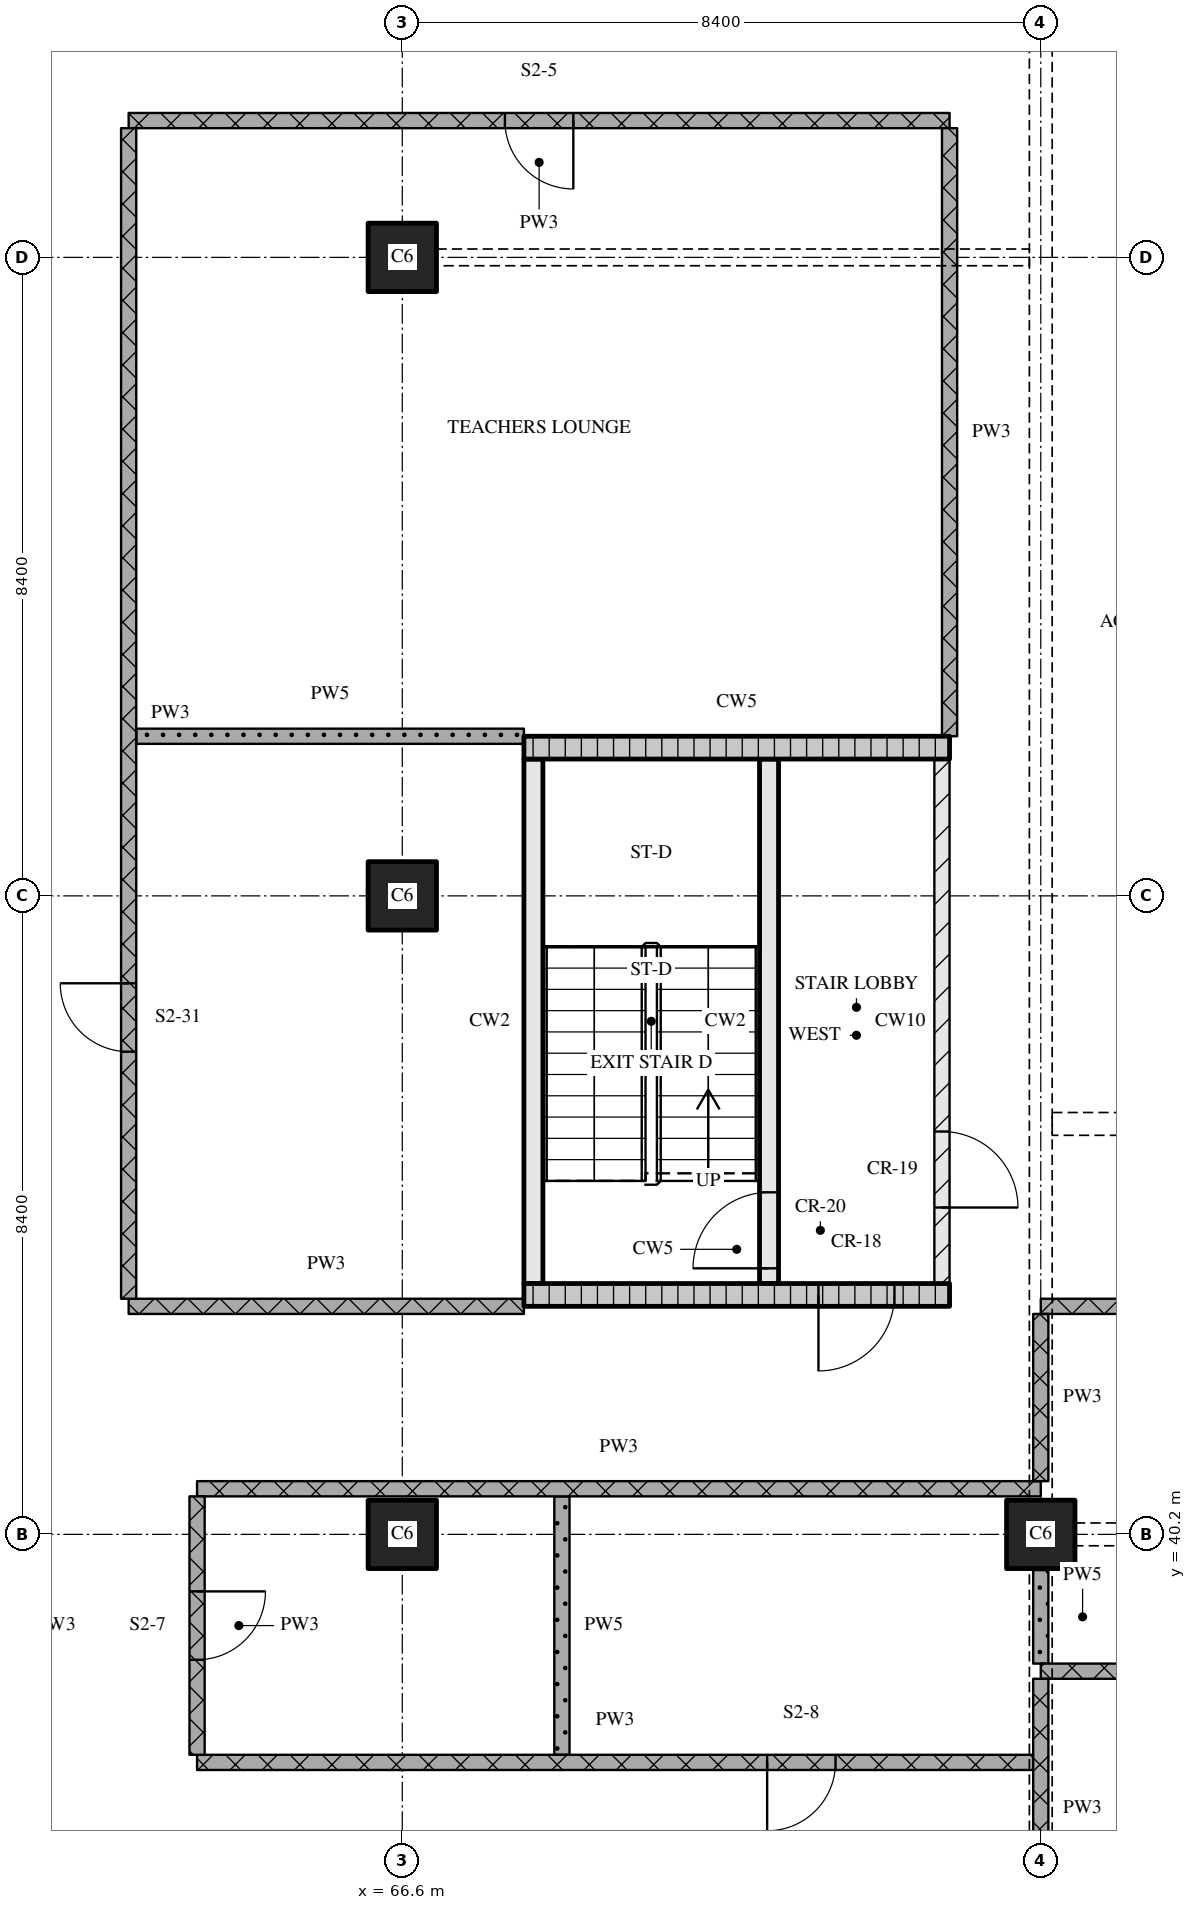
"""IFC4 building model, lengths in metres.
Left out: names, types, materials, properties, quantities, classifications, styles, units other than length and angle.
Written with IfcOpenShell. Run it as: python <this file> out.ifc"""

import sys

from ifc_helpers import new_model, si_unit, direction, frame, frame_2d, origin, origin_2d, place, context, subcontext, project, spatial, rectangle, extrude, element, fill, save


model = new_model("IFC4")
c1 = context("Model", 3, precision=1e-05, world=origin(), true_north=direction((0.0, 1.0)))
c2 = subcontext(c1, "Body", "Model", "MODEL_VIEW")
j1 = project(units=[si_unit("LENGTHUNIT", "METRE"), si_unit("PLANEANGLEUNIT", "RADIAN")], contexts=[c1])
p1 = place(None, origin())
s1 = spatial("IfcSite", under=j1, at=p1, CompositionType="ELEMENT")
p2 = place(p1, origin())
s2 = spatial("IfcBuilding", under=s1, at=p2, CompositionType="ELEMENT")
p3 = place(p2, frame((0.0, 0.0, 32.7)))
s3 = spatial("IfcBuildingStorey", under=s2, at=p3, CompositionType="ELEMENT", Elevation=32.7)
for number, where, z_axis, x_axis in (
    (1, (66.6, 40.2, 0.0), (0.0, 0.0, 1.0), (1.0, 0.0, 0.0)),
    (2, (66.6, 48.6, 0.0), (0.0, 0.0, 1.0), (1.0, 0.0, 0.0)),
    (3, (66.6, 57.0, 0.0), (0.0, 0.0, 1.0), (1.0, 0.0, 0.0)),
    (4, (75.0, 40.2, 0.0), (0.0, 0.0, 1.0), (1.0, 0.0, 0.0)),
):
    element("IfcColumn", number, at=place(p3, frame(where, z_axis=z_axis, x_axis=x_axis)), inside=s3, PredefinedType="COLUMN", context=c2, shape_type="SweptSolid", body=[
        extrude(rectangle(XDim=0.9, YDim=0.9, at=origin_2d()), origin(), (0.0, 0.0, 1.0), 4.5),
    ])
p4 = place(p3, frame((68.2, 43.35, 0.0), z_axis=(0.0, 0.0, 1.0), x_axis=(1.0, 0.0, 0.0)))
e5 = element("IfcWall", 5, at=p4, inside=s3, PredefinedType="SOLIDWALL", context=c2, shape_type="SweptSolid", body=[
    extrude(rectangle(XDim=5.6, YDim=0.3, at=frame_2d((2.8, 0.0))), origin(), (0.0, 0.0, 1.0), 4.22),
])
p5 = place(p4, frame((3.875, 0.0, 0.0)))
e6 = element("IfcOpeningElement", 6, at=p5, cuts=e5, PredefinedType="OPENING", context=c2, shape_type="SweptSolid", body=[
    extrude(rectangle(XDim=1.0, YDim=2.1, at=frame_2d((0.5, 1.05))), frame((0.0, 0.16, 0.0), z_axis=(0.0, -1.0, 0.0), x_axis=(1.0, 0.0, 0.0)), (0.0, 0.0, 1.0), 0.32),
])
p6 = place(p3, frame((68.325, 43.5, 0.0), z_axis=(0.0, 0.0, 1.0), x_axis=(0.0, 1.0, 0.0)))
e7 = element("IfcWall", 7, at=p6, inside=s3, PredefinedType="SOLIDWALL", context=c2, shape_type="SweptSolid", body=[
    extrude(rectangle(XDim=6.9, YDim=0.25, at=frame_2d((3.45, 0.0))), origin(), (0.0, 0.0, 1.0), 4.22),
])
p7 = place(p3, frame((71.425, 43.5, 0.0), z_axis=(0.0, 0.0, 1.0), x_axis=(0.0, 1.0, 0.0)))
e8 = element("IfcWall", 8, at=p7, inside=s3, PredefinedType="SOLIDWALL", context=c2, shape_type="SweptSolid", body=[
    extrude(rectangle(XDim=6.9, YDim=0.25, at=frame_2d((3.45, 0.0))), origin(), (0.0, 0.0, 1.0), 4.22),
])
p8 = place(p7, frame((0.2, 0.0, 0.0)))
e9 = element("IfcOpeningElement", 9, at=p8, cuts=e8, PredefinedType="OPENING", context=c2, shape_type="SweptSolid", body=[
    extrude(rectangle(XDim=1.0, YDim=2.1, at=frame_2d((0.5, 1.05))), frame((0.0, 0.135, 0.0), z_axis=(0.0, -1.0, 0.0), x_axis=(1.0, 0.0, 0.0)), (0.0, 0.0, 1.0), 0.27),
])
p9 = place(p3, frame((73.7, 43.5, 0.0), z_axis=(0.0, 0.0, 1.0), x_axis=(0.0, 1.0, 0.0)))
e10 = element("IfcWall", 10, at=p9, inside=s3, PredefinedType="PARTITIONING", context=c2, shape_type="SweptSolid", body=[
    extrude(rectangle(XDim=6.9, YDim=0.2, at=frame_2d((3.45, 0.0))), origin(), (0.0, 0.0, 1.0), 4.22),
])
p10 = place(p9, frame((1.0, 0.0, 0.0)))
e11 = element("IfcOpeningElement", 11, at=p10, cuts=e10, PredefinedType="OPENING", context=c2, shape_type="SweptSolid", body=[
    extrude(rectangle(XDim=1.0, YDim=2.1, at=frame_2d((0.5, 1.05))), frame((0.0, 0.11, 0.0), z_axis=(0.0, -1.0, 0.0), x_axis=(1.0, 0.0, 0.0)), (0.0, 0.0, 1.0), 0.22),
])
p11 = place(p3, frame((68.2, 50.55, 0.0), z_axis=(0.0, 0.0, 1.0), x_axis=(1.0, 0.0, 0.0)))
e12 = element("IfcWall", 12, at=p11, inside=s3, PredefinedType="SOLIDWALL", context=c2, shape_type="SweptSolid", body=[
    extrude(rectangle(XDim=5.6, YDim=0.3, at=frame_2d((2.8, 0.0))), origin(), (0.0, 0.0, 1.0), 4.22),
])
p12 = place(p3, frame((63.9, 37.2, 0.0), z_axis=(0.0, 0.0, 1.0), x_axis=(1.0, 0.0, 0.0)))
e13 = element("IfcWall", 13, at=p12, inside=s3, PredefinedType="PARTITIONING", context=c2, shape_type="SweptSolid", body=[
    extrude(rectangle(XDim=11.0, YDim=0.2, at=frame_2d((5.5, 0.0))), origin(), (0.0, 0.0, 1.0), 4.22),
])
p13 = place(p12, frame((7.5, 0.0, 0.0)))
e14 = element("IfcOpeningElement", 14, at=p13, cuts=e13, PredefinedType="OPENING", context=c2, shape_type="SweptSolid", body=[
    extrude(rectangle(XDim=0.9, YDim=2.1, at=frame_2d((0.45, 1.05))), frame((0.0, 0.11, 0.0), z_axis=(0.0, -1.0, 0.0), x_axis=(1.0, 0.0, 0.0)), (0.0, 0.0, 1.0), 0.22),
])
p14 = place(p3, frame((75.0, 38.4, 0.0), z_axis=(0.0, 0.0, 1.0), x_axis=(1.0, 0.0, 0.0)))
e15 = element("IfcWall", 15, at=p14, inside=s3, PredefinedType="PARTITIONING", context=c2, shape_type="SweptSolid", body=[
    extrude(rectangle(XDim=11.4, YDim=0.2, at=frame_2d((5.7, 0.0))), origin(), (0.0, 0.0, 1.0), 4.22),
])
p15 = place(p14, frame((1.35, 0.0, 0.0)))
e16 = element("IfcOpeningElement", 16, at=p15, cuts=e15, PredefinedType="OPENING", context=c2, shape_type="SweptSolid", body=[
    extrude(rectangle(XDim=0.9, YDim=2.1, at=frame_2d((0.45, 1.05))), frame((0.0, 0.11, 0.0), z_axis=(0.0, -1.0, 0.0), x_axis=(1.0, 0.0, 0.0)), (0.0, 0.0, 1.0), 0.22),
])
p16 = place(p14, frame((4.65, 0.0, 0.0)))
e17 = element("IfcOpeningElement", 17, at=p16, cuts=e15, PredefinedType="OPENING", context=c2, shape_type="SweptSolid", body=[
    extrude(rectangle(XDim=0.9, YDim=2.1, at=frame_2d((0.45, 1.05))), frame((0.0, 0.11, 0.0), z_axis=(0.0, -1.0, 0.0), x_axis=(1.0, 0.0, 0.0)), (0.0, 0.0, 1.0), 0.22),
])
p17 = place(p14, frame((8.55, 0.0, 0.0)))
e18 = element("IfcOpeningElement", 18, at=p17, cuts=e15, PredefinedType="OPENING", context=c2, shape_type="SweptSolid", body=[
    extrude(rectangle(XDim=0.9, YDim=2.1, at=frame_2d((0.45, 1.05))), frame((0.0, 0.11, 0.0), z_axis=(0.0, -1.0, 0.0), x_axis=(1.0, 0.0, 0.0)), (0.0, 0.0, 1.0), 0.22),
])
p18 = place(p3, frame((63.9, 40.8, 0.0), z_axis=(0.0, 0.0, 1.0), x_axis=(1.0, 0.0, 0.0)))
e19 = element("IfcWall", 19, at=p18, inside=s3, PredefinedType="PARTITIONING", context=c2, shape_type="SweptSolid", body=[
    extrude(rectangle(XDim=11.1, YDim=0.2, at=frame_2d((5.55, 0.0))), origin(), (0.0, 0.0, 1.0), 4.22),
])
p19 = place(p3, frame((63.0, 43.2, 0.0), z_axis=(0.0, 0.0, 1.0), x_axis=(1.0, 0.0, 0.0)))
e20 = element("IfcWall", 20, at=p19, inside=s3, PredefinedType="PARTITIONING", context=c2, shape_type="SweptSolid", body=[
    extrude(rectangle(XDim=5.2, YDim=0.2, at=frame_2d((2.6, 0.0))), origin(), (0.0, 0.0, 1.0), 4.22),
])
p20 = place(p3, frame((75.0, 43.2, 0.0), z_axis=(0.0, 0.0, 1.0), x_axis=(1.0, 0.0, 0.0)))
e21 = element("IfcWall", 21, at=p20, inside=s3, PredefinedType="PARTITIONING", context=c2, shape_type="SweptSolid", body=[
    extrude(rectangle(XDim=11.4, YDim=0.2, at=frame_2d((5.7, 0.0))), origin(), (0.0, 0.0, 1.0), 4.22),
])
p21 = place(p3, frame((63.1, 50.7, 0.0), z_axis=(0.0, 0.0, 1.0), x_axis=(1.0, 0.0, 0.0)))
e22 = element("IfcWall", 22, at=p21, inside=s3, PredefinedType="PARTITIONING", context=c2, shape_type="SweptSolid", body=[
    extrude(rectangle(XDim=5.1, YDim=0.2, at=frame_2d((2.55, 0.0))), origin(), (0.0, 0.0, 1.0), 4.22),
])
p22 = place(p3, frame((73.8, 58.8, 0.0), z_axis=(0.0, 0.0, 1.0), x_axis=(-1.0, 0.0, 0.0)))
e23 = element("IfcWall", 23, at=p22, inside=s3, PredefinedType="PARTITIONING", context=c2, shape_type="SweptSolid", body=[
    extrude(rectangle(XDim=10.8, YDim=0.2, at=frame_2d((5.4, 0.0))), origin(), (0.0, 0.0, 1.0), 4.22),
])
p23 = place(p22, frame((4.95, 0.0, 0.0)))
e24 = element("IfcOpeningElement", 24, at=p23, cuts=e23, PredefinedType="OPENING", context=c2, shape_type="SweptSolid", body=[
    extrude(rectangle(XDim=0.9, YDim=2.1, at=frame_2d((0.45, 1.05))), frame((0.0, 0.11, 0.0), z_axis=(0.0, -1.0, 0.0), x_axis=(1.0, 0.0, 0.0)), (0.0, 0.0, 1.0), 0.22),
])
p24 = place(p3, frame((63.0, 58.7, 0.0), z_axis=(0.0, 0.0, 1.0), x_axis=(0.0, -1.0, 0.0)))
e25 = element("IfcWall", 25, at=p24, inside=s3, PredefinedType="PARTITIONING", context=c2, shape_type="SweptSolid", body=[
    extrude(rectangle(XDim=15.4, YDim=0.2, at=frame_2d((7.7, 0.0))), origin(), (0.0, 0.0, 1.0), 4.22),
])
p25 = place(p24, frame((11.25, 0.0, 0.0)))
e26 = element("IfcOpeningElement", 26, at=p25, cuts=e25, PredefinedType="OPENING", context=c2, shape_type="SweptSolid", body=[
    extrude(rectangle(XDim=0.9, YDim=2.1, at=frame_2d((0.45, 1.05))), frame((0.0, 0.11, 0.0), z_axis=(0.0, -1.0, 0.0), x_axis=(1.0, 0.0, 0.0)), (0.0, 0.0, 1.0), 0.22),
])
p26 = place(p3, frame((63.9, 40.7, 0.0), z_axis=(0.0, 0.0, 1.0), x_axis=(0.0, -1.0, 0.0)))
e27 = element("IfcWall", 27, at=p26, inside=s3, PredefinedType="PARTITIONING", context=c2, shape_type="SweptSolid", body=[
    extrude(rectangle(XDim=3.4, YDim=0.2, at=frame_2d((1.7, 0.0))), origin(), (0.0, 0.0, 1.0), 4.22),
])
p27 = place(p26, frame((1.25, 0.0, 0.0)))
e28 = element("IfcOpeningElement", 28, at=p27, cuts=e27, PredefinedType="OPENING", context=c2, shape_type="SweptSolid", body=[
    extrude(rectangle(XDim=0.9, YDim=2.1, at=frame_2d((0.45, 1.05))), frame((0.0, 0.11, 0.0), z_axis=(0.0, -1.0, 0.0), x_axis=(1.0, 0.0, 0.0)), (0.0, 0.0, 1.0), 0.22),
])
p28 = place(p3, frame((68.7, 40.7, 0.0), z_axis=(0.0, 0.0, 1.0), x_axis=(0.0, -1.0, 0.0)))
e29 = element("IfcWall", 29, at=p28, inside=s3, PredefinedType="PARTITIONING", context=c2, shape_type="SweptSolid", body=[
    extrude(rectangle(XDim=3.4, YDim=0.2, at=frame_2d((1.7, 0.0))), origin(), (0.0, 0.0, 1.0), 4.22),
])
p29 = place(p3, frame((73.8, 58.7, 0.0), z_axis=(0.0, 0.0, 1.0), x_axis=(0.0, -1.0, 0.0)))
e30 = element("IfcWall", 30, at=p29, inside=s3, PredefinedType="PARTITIONING", context=c2, shape_type="SweptSolid", body=[
    extrude(rectangle(XDim=8.0, YDim=0.2, at=frame_2d((4.0, 0.0))), origin(), (0.0, 0.0, 1.0), 4.22),
])
p30 = place(p3, frame((75.0, 38.3, 0.0), z_axis=(0.0, 0.0, 1.0), x_axis=(0.0, -1.0, 0.0)))
e31 = element("IfcWall", 31, at=p30, inside=s3, PredefinedType="PARTITIONING", context=c2, shape_type="SweptSolid", body=[
    extrude(rectangle(XDim=3.4, YDim=0.2, at=frame_2d((1.7, 0.0))), origin(), (0.0, 0.0, 1.0), 3.73),
])
p31 = place(p3, frame((75.0, 43.1, 0.0), z_axis=(0.0, 0.0, 1.0), x_axis=(0.0, -1.0, 0.0)))
e32 = element("IfcWall", 32, at=p31, inside=s3, PredefinedType="PARTITIONING", context=c2, shape_type="SweptSolid", body=[
    extrude(rectangle(XDim=2.2, YDim=0.2, at=frame_2d((1.1, 0.0))), origin(), (0.0, 0.0, 1.0), 3.33),
])
p32 = place(p3, frame((75.0, 39.73, 0.0), z_axis=(0.0, 0.0, 1.0), x_axis=(0.0, -1.0, 0.0)))
e33 = element("IfcWall", 33, at=p32, inside=s3, PredefinedType="PARTITIONING", context=c2, shape_type="SweptSolid", body=[
    extrude(rectangle(XDim=1.23, YDim=0.2, at=frame_2d((0.615, 0.0))), origin(), (0.0, 0.0, 1.0), 3.73),
])
p33 = place(p5, origin())
e34 = element("IfcDoor", 34, at=p33, inside=s3, OperationType="SINGLE_SWING_RIGHT", PredefinedType="DOOR", context=c2, shape_type="SweptSolid", body=[
    extrude(rectangle(XDim=1.0, YDim=2.1, at=frame_2d((0.5, 1.05))), frame((0.0, 0.025, 0.0), z_axis=(0.0, -1.0, 0.0), x_axis=(1.0, 0.0, 0.0)), (0.0, 0.0, 1.0), 0.05),
])
fill(e6, e34)
p34 = place(p8, origin())
e35 = element("IfcDoor", 35, at=p34, inside=s3, OperationType="SINGLE_SWING_LEFT", PredefinedType="DOOR", context=c2, shape_type="SweptSolid", body=[
    extrude(rectangle(XDim=1.0, YDim=2.1, at=frame_2d((0.5, 1.05))), frame((0.0, 0.025, 0.0), z_axis=(0.0, -1.0, 0.0), x_axis=(1.0, 0.0, 0.0)), (0.0, 0.0, 1.0), 0.05),
])
fill(e9, e35)
p35 = place(p10, origin())
e36 = element("IfcDoor", 36, at=p35, inside=s3, OperationType="SINGLE_SWING_RIGHT", PredefinedType="DOOR", context=c2, shape_type="SweptSolid", body=[
    extrude(rectangle(XDim=1.0, YDim=2.1, at=frame_2d((0.5, 1.05))), frame((0.0, 0.025, 0.0), z_axis=(0.0, -1.0, 0.0), x_axis=(1.0, 0.0, 0.0)), (0.0, 0.0, 1.0), 0.05),
])
fill(e11, e36)
p36 = place(p13, origin())
e37 = element("IfcDoor", 37, at=p36, inside=s3, OperationType="SINGLE_SWING_RIGHT", PredefinedType="DOOR", context=c2, shape_type="SweptSolid", body=[
    extrude(rectangle(XDim=0.9, YDim=2.1, at=frame_2d((0.45, 1.05))), frame((0.0, 0.025, 0.0), z_axis=(0.0, -1.0, 0.0), x_axis=(1.0, 0.0, 0.0)), (0.0, 0.0, 1.0), 0.05),
])
fill(e14, e37)
p37 = place(p23, origin())
e38 = element("IfcDoor", 38, at=p37, inside=s3, OperationType="SINGLE_SWING_LEFT", PredefinedType="DOOR", context=c2, shape_type="SweptSolid", body=[
    extrude(rectangle(XDim=0.9, YDim=2.1, at=frame_2d((0.45, 1.05))), frame((0.0, 0.025, 0.0), z_axis=(0.0, -1.0, 0.0), x_axis=(1.0, 0.0, 0.0)), (0.0, 0.0, 1.0), 0.05),
])
fill(e24, e38)
p38 = place(p25, origin())
e39 = element("IfcDoor", 39, at=p38, inside=s3, OperationType="SINGLE_SWING_RIGHT", PredefinedType="DOOR", context=c2, shape_type="SweptSolid", body=[
    extrude(rectangle(XDim=0.9, YDim=2.1, at=frame_2d((0.45, 1.05))), frame((0.0, 0.025, 0.0), z_axis=(0.0, -1.0, 0.0), x_axis=(1.0, 0.0, 0.0)), (0.0, 0.0, 1.0), 0.05),
])
fill(e26, e39)
p39 = place(p27, origin())
e40 = element("IfcDoor", 40, at=p39, inside=s3, OperationType="SINGLE_SWING_LEFT", PredefinedType="DOOR", context=c2, shape_type="SweptSolid", body=[
    extrude(rectangle(XDim=0.9, YDim=2.1, at=frame_2d((0.45, 1.05))), frame((0.0, 0.025, 0.0), z_axis=(0.0, -1.0, 0.0), x_axis=(1.0, 0.0, 0.0)), (0.0, 0.0, 1.0), 0.05),
])
fill(e28, e40)
save(model, sys.argv[1])
